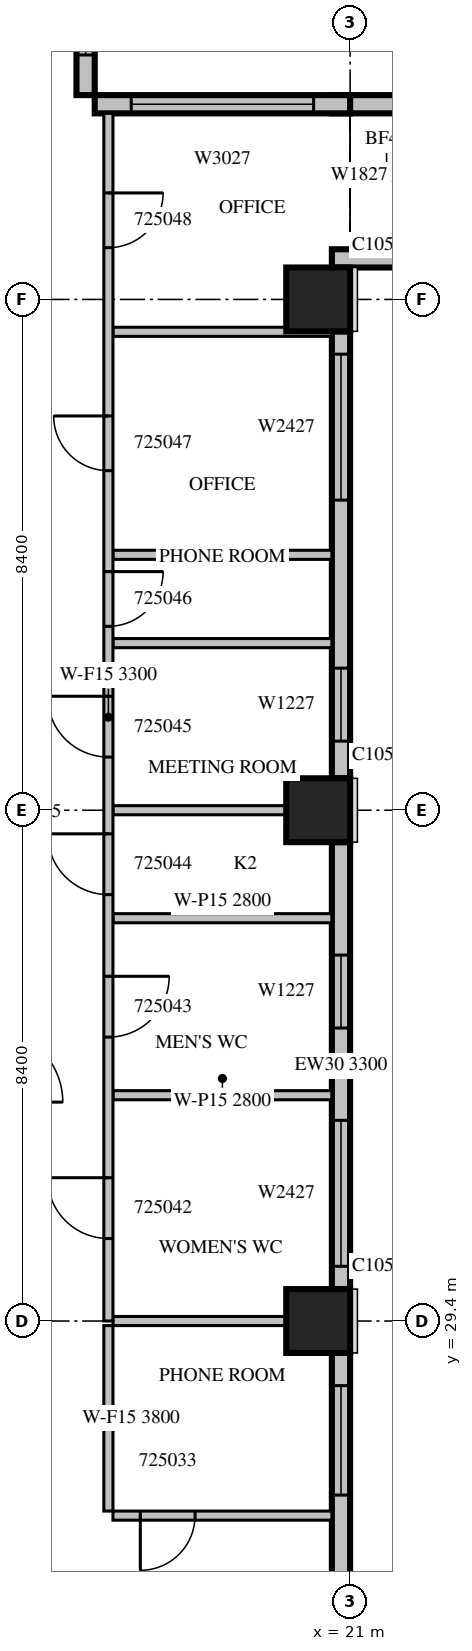
"""IFC4 building model, lengths in metres.
Left out: names, types, materials, properties, quantities, classifications, styles, units other than length and angle.
Written with IfcOpenShell. Run it as: python <this file> out.ifc"""

import sys

from ifc_helpers import new_model, si_unit, direction, frame, frame_2d, origin, origin_2d, place, context, subcontext, project, spatial, rectangle, extrude, source, transform, mapped, element, fill, save


model = new_model("IFC4")
c1 = context("Model", 3, precision=1e-05, world=origin(), true_north=direction((0.0, 1.0)))
c2 = subcontext(c1, "Body", "Model", "MODEL_VIEW")
j1 = project(units=[si_unit("LENGTHUNIT", "METRE"), si_unit("PLANEANGLEUNIT", "RADIAN")], contexts=[c1])
p1 = place(None, origin())
s1 = spatial("IfcSite", under=j1, at=p1, CompositionType="ELEMENT")
p2 = place(p1, origin())
s2 = spatial("IfcBuilding", under=s1, at=p2, CompositionType="ELEMENT")
p3 = place(p2, frame((0.0, 0.0, 116.1)))
s3 = spatial("IfcBuildingStorey", under=s2, at=p3, CompositionType="ELEMENT", Elevation=116.1)
m1 = source(origin(), c2, "Body", "SweptSolid", [
    extrude(rectangle(XDim=1.05, YDim=1.05, at=origin_2d()), origin(), (0.0, 0.0, 1.0), 4.2),
])
for number, where, z_axis, x_axis in (
    (1, (20.475, 29.4, 0.0), (0.0, 0.0, 1.0), (1.0, 0.0, 0.0)),
    (2, (20.475, 37.8, 0.0), (0.0, 0.0, 1.0), (1.0, 0.0, 0.0)),
    (3, (20.475, 46.2, 0.0), (0.0, 0.0, 1.0), (1.0, 0.0, 0.0)),
):
    element("IfcColumn", number, at=place(p3, frame(where, z_axis=z_axis, x_axis=x_axis)), inside=s3, PredefinedType="COLUMN", context=c2, shape_type="MappedRepresentation", body=[
        mapped(m1, transform((0.0, 0.0, 0.0), scale=1.0)),
    ])
m2 = source(origin(), c2, "Body", "SweptSolid", [
    extrude(rectangle(XDim=6.875, YDim=0.3, at=frame_2d((3.438, 0.0))), origin(), (0.0, 0.0, 1.0), 3.8),
])
p4 = place(p3, frame((20.85, 22.0, 0.0), z_axis=(0.0, 0.0, 1.0), x_axis=(0.0, 1.0, 0.0)))
e4 = element("IfcWall", 4, at=p4, inside=s3, PredefinedType="STANDARD", context=c2, shape_type="MappedRepresentation", body=[
    mapped(m2, transform((0.0, 0.0, 0.0), scale=1.0)),
])
m3 = source(origin(), c2, "Body", "SweptSolid", [
    extrude(rectangle(XDim=1.8, YDim=2.7, at=frame_2d((0.9, 1.35))), frame((0.0, 0.16, 0.0), z_axis=(0.0, -1.0, 0.0), x_axis=(1.0, 0.0, 0.0)), (0.0, 0.0, 1.0), 0.32),
])
p5 = place(p4, frame((0.2, 0.0, 0.6)))
e5 = element("IfcOpeningElement", 5, at=p5, cuts=e4, PredefinedType="OPENING", context=c2, shape_type="MappedRepresentation", body=[
    mapped(m3, transform((0.0, 0.0, 0.0), scale=1.0)),
])
p6 = place(p4, frame((4.537, 0.0, 0.6)))
e6 = element("IfcOpeningElement", 6, at=p6, cuts=e4, PredefinedType="OPENING", context=c2, shape_type="MappedRepresentation", body=[
    mapped(m3, transform((0.0, 0.0, 0.0), scale=1.0)),
])
m4 = source(origin(), c2, "Body", "SweptSolid", [
    extrude(rectangle(XDim=7.35, YDim=0.3, at=frame_2d((3.675, 0.0))), origin(), (0.0, 0.0, 1.0), 3.3),
])
p7 = place(p3, frame((20.85, 29.925, 0.0), z_axis=(0.0, 0.0, 1.0), x_axis=(0.0, 1.0, 0.0)))
e7 = element("IfcWall", 7, at=p7, inside=s3, PredefinedType="STANDARD", context=c2, shape_type="MappedRepresentation", body=[
    mapped(m4, transform((0.0, 0.0, 0.0), scale=1.0)),
])
m5 = source(origin(), c2, "Body", "SweptSolid", [
    extrude(rectangle(XDim=2.4, YDim=2.7, at=frame_2d((1.2, 1.35))), frame((0.0, 0.16, 0.0), z_axis=(0.0, -1.0, 0.0), x_axis=(1.0, 0.0, 0.0)), (0.0, 0.0, 1.0), 0.32),
])
p8 = place(p7, frame((0.375, 0.0, 0.6)))
e8 = element("IfcOpeningElement", 8, at=p8, cuts=e7, PredefinedType="OPENING", context=c2, shape_type="MappedRepresentation", body=[
    mapped(m5, transform((0.0, 0.0, 0.0), scale=1.0)),
])
m6 = source(origin(), c2, "Body", "SweptSolid", [
    extrude(rectangle(XDim=1.2, YDim=2.7, at=frame_2d((0.6, 1.35))), frame((0.0, 0.16, 0.0), z_axis=(0.0, -1.0, 0.0), x_axis=(1.0, 0.0, 0.0)), (0.0, 0.0, 1.0), 0.32),
])
p9 = place(p7, frame((4.293, 0.0, 0.6)))
e9 = element("IfcOpeningElement", 9, at=p9, cuts=e7, PredefinedType="OPENING", context=c2, shape_type="MappedRepresentation", body=[
    mapped(m6, transform((0.0, 0.0, 0.0), scale=1.0)),
])
m7 = source(origin(), c2, "Body", "SweptSolid", [
    extrude(rectangle(XDim=7.35, YDim=0.3, at=frame_2d((3.675, 0.0))), origin(), (0.0, 0.0, 1.0), 3.8),
])
p10 = place(p3, frame((20.85, 38.325, 0.0), z_axis=(0.0, 0.0, 1.0), x_axis=(0.0, 1.0, 0.0)))
e10 = element("IfcWall", 10, at=p10, inside=s3, PredefinedType="STANDARD", context=c2, shape_type="MappedRepresentation", body=[
    mapped(m7, transform((0.0, 0.0, 0.0), scale=1.0)),
])
p11 = place(p10, frame((0.612, 0.0, 0.6)))
e11 = element("IfcOpeningElement", 11, at=p11, cuts=e10, PredefinedType="OPENING", context=c2, shape_type="MappedRepresentation", body=[
    mapped(m6, transform((0.0, 0.0, 0.0), scale=1.0)),
])
p12 = place(p10, frame((4.575, 0.0, 0.6)))
e12 = element("IfcOpeningElement", 12, at=p12, cuts=e10, PredefinedType="OPENING", context=c2, shape_type="MappedRepresentation", body=[
    mapped(m5, transform((0.0, 0.0, 0.0), scale=1.0)),
])
m8 = source(origin(), c2, "Body", "SweptSolid", [
    extrude(rectangle(XDim=1.2, YDim=0.3, at=frame_2d((0.6, 0.0))), origin(), (0.0, 0.0, 1.0), 3.8),
])
for number, where, z_axis, x_axis in (
    (13, (20.7, 46.875, 0.0), (0.0, 0.0, 1.0), (1.0, 0.0, 0.0)),
    (14, (20.7, 49.41, 0.0), (0.0, 0.0, 1.0), (1.0, 0.0, 0.0)),
):
    element("IfcWall", number, at=place(p3, frame(where, z_axis=z_axis, x_axis=x_axis)), inside=s3, PredefinedType="STANDARD", context=c2, shape_type="MappedRepresentation", body=[
        mapped(m8, transform((0.0, 0.0, 0.0), scale=1.0)),
    ])
m9 = source(origin(), c2, "Body", "SweptSolid", [
    extrude(rectangle(XDim=4.2, YDim=0.3, at=frame_2d((2.1, 0.0))), origin(), (0.0, 0.0, 1.0), 3.8),
])
p13 = place(p3, frame((21.0, 49.41, 0.0), z_axis=(0.0, 0.0, 1.0), x_axis=(-1.0, 0.0, 0.0)))
e15 = element("IfcWall", 15, at=p13, inside=s3, PredefinedType="STANDARD", context=c2, shape_type="MappedRepresentation", body=[
    mapped(m9, transform((0.0, 0.0, 0.0), scale=1.0)),
])
m10 = source(origin(), c2, "Body", "SweptSolid", [
    extrude(rectangle(XDim=3.0, YDim=2.7, at=frame_2d((1.5, 1.35))), frame((0.0, 0.16, 0.0), z_axis=(0.0, -1.0, 0.0), x_axis=(1.0, 0.0, 0.0)), (0.0, 0.0, 1.0), 0.32),
])
p14 = place(p13, frame((0.6, 0.0, 0.6)))
e16 = element("IfcOpeningElement", 16, at=p14, cuts=e15, PredefinedType="OPENING", context=c2, shape_type="MappedRepresentation", body=[
    mapped(m10, transform((0.0, 0.0, 0.0), scale=1.0)),
])
m11 = source(origin(), c2, "Body", "SweptSolid", [
    extrude(rectangle(XDim=2.52, YDim=0.3, at=frame_2d((1.26, 0.0))), origin(), (0.0, 0.0, 1.0), 3.8),
])
p15 = place(p3, frame((16.65, 49.56, 0.0), z_axis=(0.0, 0.0, 1.0), x_axis=(0.0, 1.0, 0.0)))
e17 = element("IfcWall", 17, at=p15, inside=s3, PredefinedType="STANDARD", context=c2, shape_type="MappedRepresentation", body=[
    mapped(m11, transform((0.0, 0.0, 0.0), scale=1.0)),
])
p16 = place(p15, frame((0.66, 0.0, 0.6)))
e18 = element("IfcOpeningElement", 18, at=p16, cuts=e17, PredefinedType="OPENING", context=c2, shape_type="MappedRepresentation", body=[
    mapped(m6, transform((0.0, 0.0, 0.0), scale=1.0)),
])
m12 = source(origin(), c2, "Body", "SweptSolid", [
    extrude(rectangle(XDim=3.6, YDim=0.15, at=frame_2d((1.8, 0.0))), origin(), (0.0, 0.0, 1.0), 3.8),
])
p17 = place(p3, frame((17.1, 26.2, 0.0), z_axis=(0.0, 0.0, 1.0), x_axis=(1.0, 0.0, 0.0)))
e19 = element("IfcWall", 19, at=p17, inside=s3, PredefinedType="PARTITIONING", context=c2, shape_type="MappedRepresentation", body=[
    mapped(m12, transform((0.0, 0.0, 0.0), scale=1.0)),
])
m13 = source(origin(), c2, "Body", "SweptSolid", [
    extrude(rectangle(XDim=0.9, YDim=2.1, at=frame_2d((0.45, 1.05))), frame((0.0, 0.085, 0.0), z_axis=(0.0, -1.0, 0.0), x_axis=(1.0, 0.0, 0.0)), (0.0, 0.0, 1.0), 0.17),
])
p18 = place(p17, frame((0.45, 0.0, 0.0)))
e20 = element("IfcOpeningElement", 20, at=p18, cuts=e19, PredefinedType="OPENING", context=c2, shape_type="MappedRepresentation", body=[
    mapped(m13, transform((0.0, 0.0, 0.0), scale=1.0)),
])
m14 = source(origin(), c2, "Body", "SweptSolid", [
    extrude(rectangle(XDim=3.05, YDim=0.15, at=frame_2d((1.525, 0.0))), origin(), (0.0, 0.0, 1.0), 3.8),
])
p19 = place(p3, frame((17.025, 29.325, 0.0), z_axis=(0.0, 0.0, 1.0), x_axis=(0.0, -1.0, 0.0)))
e21 = element("IfcWall", 21, at=p19, inside=s3, PredefinedType="PARTITIONING", context=c2, shape_type="MappedRepresentation", body=[
    mapped(m14, transform((0.0, 0.0, 0.0), scale=1.0)),
])
m15 = source(origin(), c2, "Body", "SweptSolid", [
    extrude(rectangle(XDim=2.851, YDim=0.15, at=frame_2d((1.425, 0.0))), origin(), (0.0, 0.0, 1.0), 3.8),
])
p20 = place(p3, frame((19.951, 29.4, 0.0), z_axis=(0.0, 0.0, 1.0), x_axis=(-1.0, 0.0, 0.0)))
e22 = element("IfcWall", 22, at=p20, inside=s3, PredefinedType="PARTITIONING", context=c2, shape_type="MappedRepresentation", body=[
    mapped(m15, transform((0.0, 0.0, 0.0), scale=1.0)),
])
m16 = source(origin(), c2, "Body", "SweptSolid", [
    extrude(rectangle(XDim=3.6, YDim=0.15, at=frame_2d((1.8, 0.0))), origin(), (0.0, 0.0, 1.0), 2.8),
])
for number, where, z_axis, x_axis in (
    (23, (17.1, 33.113, 0.0), (0.0, 0.0, 1.0), (1.0, 0.0, 0.0)),
    (24, (17.1, 36.024, 0.0), (0.0, 0.0, 1.0), (1.0, 0.0, 0.0)),
):
    element("IfcWall", number, at=place(p3, frame(where, z_axis=z_axis, x_axis=x_axis)), inside=s3, PredefinedType="PARTITIONING", context=c2, shape_type="MappedRepresentation", body=[
        mapped(m16, transform((0.0, 0.0, 0.0), scale=1.0)),
    ])
for number, where, z_axis, x_axis in (
    (25, (17.1, 40.548, 0.0), (0.0, 0.0, 1.0), (1.0, 0.0, 0.0)),
    (26, (17.1, 45.667, 0.0), (0.0, 0.0, 1.0), (1.0, 0.0, 0.0)),
):
    element("IfcWall", number, at=place(p3, frame(where, z_axis=z_axis, x_axis=x_axis)), inside=s3, PredefinedType="PARTITIONING", context=c2, shape_type="MappedRepresentation", body=[
        mapped(m12, transform((0.0, 0.0, 0.0), scale=1.0)),
    ])
p21 = place(p3, frame((19.951, 37.8, 0.0), z_axis=(0.0, 0.0, 1.0), x_axis=(-1.0, 0.0, 0.0)))
e27 = element("IfcWall", 27, at=p21, inside=s3, PredefinedType="PARTITIONING", context=c2, shape_type="MappedRepresentation", body=[
    mapped(m15, transform((0.0, 0.0, 0.0), scale=1.0)),
])
p22 = place(p3, frame((20.7, 42.0, 0.0), z_axis=(0.0, 0.0, 1.0), x_axis=(-1.0, 0.0, 0.0)))
e28 = element("IfcWall", 28, at=p22, inside=s3, PredefinedType="PARTITIONING", context=c2, shape_type="MappedRepresentation", body=[
    mapped(m12, transform((0.0, 0.0, 0.0), scale=1.0)),
])
m17 = source(origin(), c2, "Body", "SweptSolid", [
    extrude(rectangle(XDim=19.86, YDim=0.15, at=frame_2d((9.93, 0.0))), origin(), (0.0, 0.0, 1.0), 3.3),
])
p23 = place(p3, frame((17.025, 49.26, 0.0), z_axis=(0.0, 0.0, 1.0), x_axis=(0.0, -1.0, 0.0)))
e29 = element("IfcWall", 29, at=p23, inside=s3, PredefinedType="PARTITIONING", context=c2, shape_type="MappedRepresentation", body=[
    mapped(m17, transform((0.0, 0.0, 0.0), scale=1.0)),
])
m18 = source(origin(), c2, "Body", "SweptSolid", [
    extrude(rectangle(XDim=1.0, YDim=2.1, at=frame_2d((0.5, 1.05))), frame((0.0, 0.085, 0.0), z_axis=(0.0, -1.0, 0.0), x_axis=(1.0, 0.0, 0.0)), (0.0, 0.0, 1.0), 0.17),
])
p24 = place(p23, frame((17.503, 0.0, 0.0)))
e30 = element("IfcOpeningElement", 30, at=p24, cuts=e29, PredefinedType="OPENING", context=c2, shape_type="MappedRepresentation", body=[
    mapped(m18, transform((0.0, 0.0, 0.0), scale=1.0)),
])
p25 = place(p23, frame((14.191, 0.0, 0.0)))
e31 = element("IfcOpeningElement", 31, at=p25, cuts=e29, PredefinedType="OPENING", context=c2, shape_type="MappedRepresentation", body=[
    mapped(m18, transform((0.0, 0.0, 0.0), scale=1.0)),
])
p26 = place(p23, frame((11.848, 0.0, 0.0)))
e32 = element("IfcOpeningElement", 32, at=p26, cuts=e29, PredefinedType="OPENING", context=c2, shape_type="MappedRepresentation", body=[
    mapped(m18, transform((0.0, 0.0, 0.0), scale=1.0)),
])
p27 = place(p23, frame((9.586, 0.0, 0.0)))
e33 = element("IfcOpeningElement", 33, at=p27, cuts=e29, PredefinedType="OPENING", context=c2, shape_type="MappedRepresentation", body=[
    mapped(m18, transform((0.0, 0.0, 0.0), scale=1.0)),
])
p28 = place(p23, frame((7.536, 0.0, 0.0)))
e34 = element("IfcOpeningElement", 34, at=p28, cuts=e29, PredefinedType="OPENING", context=c2, shape_type="MappedRepresentation", body=[
    mapped(m13, transform((0.0, 0.0, 0.0), scale=1.0)),
])
p29 = place(p23, frame((4.976, 0.0, 0.0)))
e35 = element("IfcOpeningElement", 35, at=p29, cuts=e29, PredefinedType="OPENING", context=c2, shape_type="MappedRepresentation", body=[
    mapped(m13, transform((0.0, 0.0, 0.0), scale=1.0)),
])
p30 = place(p23, frame((1.309, 0.0, 0.0)))
e36 = element("IfcOpeningElement", 36, at=p30, cuts=e29, PredefinedType="OPENING", context=c2, shape_type="MappedRepresentation", body=[
    mapped(m13, transform((0.0, 0.0, 0.0), scale=1.0)),
])
m19 = source(origin(), c2, "Body", "SweptSolid", [
    extrude(rectangle(XDim=1.8, YDim=2.7, at=frame_2d((0.9, 1.35))), frame((0.0, 0.03, 0.0), z_axis=(0.0, -1.0, 0.0), x_axis=(1.0, 0.0, 0.0)), (0.0, 0.0, 1.0), 0.06),
])
p31 = place(p6, origin())
e37 = element("IfcWindow", 37, at=p31, inside=s3, PartitioningType="SINGLE_PANEL", PredefinedType="WINDOW", context=c2, shape_type="MappedRepresentation", body=[
    mapped(m19, transform((0.0, 0.0, 0.0), scale=1.0)),
])
fill(e6, e37)
m20 = source(origin(), c2, "Body", "SweptSolid", [
    extrude(rectangle(XDim=2.4, YDim=2.7, at=frame_2d((1.2, 1.35))), frame((0.0, 0.03, 0.0), z_axis=(0.0, -1.0, 0.0), x_axis=(1.0, 0.0, 0.0)), (0.0, 0.0, 1.0), 0.06),
])
p32 = place(p8, origin())
e38 = element("IfcWindow", 38, at=p32, inside=s3, PartitioningType="SINGLE_PANEL", PredefinedType="WINDOW", context=c2, shape_type="MappedRepresentation", body=[
    mapped(m20, transform((0.0, 0.0, 0.0), scale=1.0)),
])
fill(e8, e38)
m21 = source(origin(), c2, "Body", "SweptSolid", [
    extrude(rectangle(XDim=1.2, YDim=2.7, at=frame_2d((0.6, 1.35))), frame((0.0, 0.03, 0.0), z_axis=(0.0, -1.0, 0.0), x_axis=(1.0, 0.0, 0.0)), (0.0, 0.0, 1.0), 0.06),
])
p33 = place(p9, origin())
e39 = element("IfcWindow", 39, at=p33, inside=s3, PartitioningType="SINGLE_PANEL", PredefinedType="WINDOW", context=c2, shape_type="MappedRepresentation", body=[
    mapped(m21, transform((0.0, 0.0, 0.0), scale=1.0)),
])
fill(e9, e39)
p34 = place(p11, origin())
e40 = element("IfcWindow", 40, at=p34, inside=s3, PartitioningType="SINGLE_PANEL", PredefinedType="WINDOW", context=c2, shape_type="MappedRepresentation", body=[
    mapped(m21, transform((0.0, 0.0, 0.0), scale=1.0)),
])
fill(e11, e40)
p35 = place(p12, origin())
e41 = element("IfcWindow", 41, at=p35, inside=s3, PartitioningType="SINGLE_PANEL", PredefinedType="WINDOW", context=c2, shape_type="MappedRepresentation", body=[
    mapped(m20, transform((0.0, 0.0, 0.0), scale=1.0)),
])
fill(e12, e41)
m22 = source(origin(), c2, "Body", "SweptSolid", [
    extrude(rectangle(XDim=3.0, YDim=2.7, at=frame_2d((1.5, 1.35))), frame((0.0, 0.03, 0.0), z_axis=(0.0, -1.0, 0.0), x_axis=(1.0, 0.0, 0.0)), (0.0, 0.0, 1.0), 0.06),
])
p36 = place(p14, origin())
e42 = element("IfcWindow", 42, at=p36, inside=s3, PartitioningType="SINGLE_PANEL", PredefinedType="WINDOW", context=c2, shape_type="MappedRepresentation", body=[
    mapped(m22, transform((0.0, 0.0, 0.0), scale=1.0)),
])
fill(e16, e42)
p37 = place(p16, origin())
e43 = element("IfcWindow", 43, at=p37, inside=s3, PartitioningType="SINGLE_PANEL", PredefinedType="WINDOW", context=c2, shape_type="MappedRepresentation", body=[
    mapped(m21, transform((0.0, 0.0, 0.0), scale=1.0)),
])
fill(e18, e43)
m23 = source(origin(), c2, "Body", "SweptSolid", [
    extrude(rectangle(XDim=0.9, YDim=2.1, at=frame_2d((0.45, 1.05))), frame((0.0, 0.025, 0.0), z_axis=(0.0, -1.0, 0.0), x_axis=(1.0, 0.0, 0.0)), (0.0, 0.0, 1.0), 0.05),
])
p38 = place(p18, origin())
e44 = element("IfcDoor", 44, at=p38, inside=s3, OperationType="SINGLE_SWING_RIGHT", PredefinedType="DOOR", context=c2, shape_type="MappedRepresentation", body=[
    mapped(m23, transform((0.0, 0.0, 0.0), scale=1.0)),
])
fill(e20, e44)
m24 = source(origin(), c2, "Body", "SweptSolid", [
    extrude(rectangle(XDim=1.0, YDim=2.1, at=frame_2d((0.5, 1.05))), frame((0.0, 0.025, 0.0), z_axis=(0.0, -1.0, 0.0), x_axis=(1.0, 0.0, 0.0)), (0.0, 0.0, 1.0), 0.05),
])
p39 = place(p24, origin())
e45 = element("IfcDoor", 45, at=p39, inside=s3, OperationType="SINGLE_SWING_RIGHT", PredefinedType="DOOR", context=c2, shape_type="MappedRepresentation", body=[
    mapped(m24, transform((0.0, 0.0, 0.0), scale=1.0)),
])
fill(e30, e45)
p40 = place(p25, origin())
e46 = element("IfcDoor", 46, at=p40, inside=s3, OperationType="SINGLE_SWING_LEFT", PredefinedType="DOOR", context=c2, shape_type="MappedRepresentation", body=[
    mapped(m24, transform((0.0, 0.0, 0.0), scale=1.0)),
])
fill(e31, e46)
p41 = place(p26, origin())
e47 = element("IfcDoor", 47, at=p41, inside=s3, OperationType="SINGLE_SWING_RIGHT", PredefinedType="DOOR", context=c2, shape_type="MappedRepresentation", body=[
    mapped(m24, transform((0.0, 0.0, 0.0), scale=1.0)),
])
fill(e32, e47)
p42 = place(p27, origin())
e48 = element("IfcDoor", 48, at=p42, inside=s3, OperationType="SINGLE_SWING_RIGHT", PredefinedType="DOOR", context=c2, shape_type="MappedRepresentation", body=[
    mapped(m24, transform((0.0, 0.0, 0.0), scale=1.0)),
])
fill(e33, e48)
p43 = place(p28, origin())
e49 = element("IfcDoor", 49, at=p43, inside=s3, OperationType="SINGLE_SWING_LEFT", PredefinedType="DOOR", context=c2, shape_type="MappedRepresentation", body=[
    mapped(m23, transform((0.0, 0.0, 0.0), scale=1.0)),
])
fill(e34, e49)
p44 = place(p29, origin())
e50 = element("IfcDoor", 50, at=p44, inside=s3, OperationType="SINGLE_SWING_RIGHT", PredefinedType="DOOR", context=c2, shape_type="MappedRepresentation", body=[
    mapped(m23, transform((0.0, 0.0, 0.0), scale=1.0)),
])
fill(e35, e50)
p45 = place(p30, origin())
e51 = element("IfcDoor", 51, at=p45, inside=s3, OperationType="SINGLE_SWING_LEFT", PredefinedType="DOOR", context=c2, shape_type="MappedRepresentation", body=[
    mapped(m23, transform((0.0, 0.0, 0.0), scale=1.0)),
])
fill(e36, e51)
save(model, sys.argv[1])
